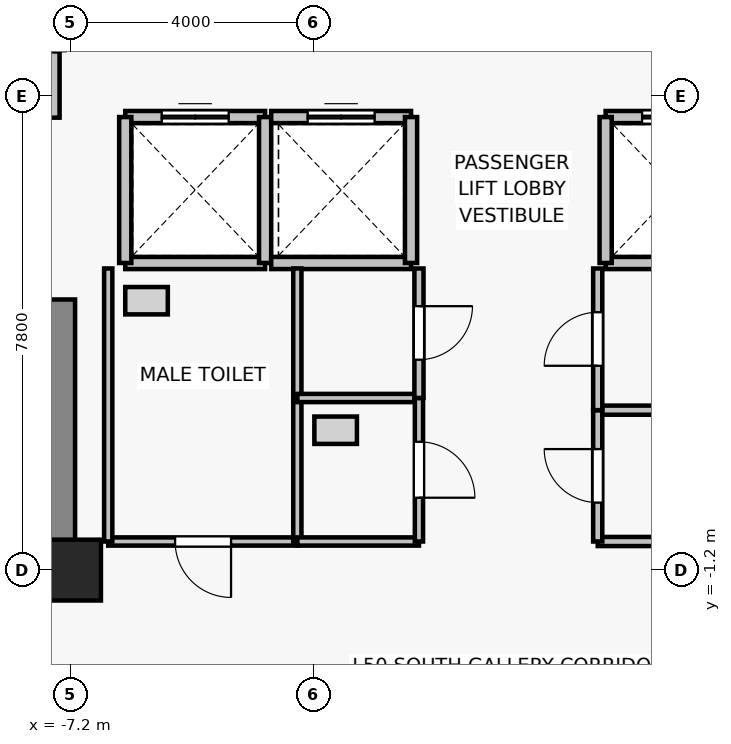
"""IFC4 building model, lengths in metres.
Left out: names, types, materials, properties, quantities, classifications, styles, units other than length and angle.
Written with IfcOpenShell. Run it as: python <this file> out.ifc"""

import sys

from ifc_helpers import new_model, si_unit, direction, frame, frame_2d, origin, origin_2d, place, context, subcontext, project, spatial, rectangle, extrude, source, transform, mapped, element, fill, save


model = new_model("IFC4")
c1 = context("Model", 3, precision=1e-05, world=origin(), true_north=direction((0.0, 1.0)))
c2 = subcontext(c1, "Body", "Model", "MODEL_VIEW")
j1 = project(units=[si_unit("LENGTHUNIT", "METRE"), si_unit("PLANEANGLEUNIT", "RADIAN")], contexts=[c1])
p1 = place(None, origin())
s1 = spatial("IfcSite", under=j1, at=p1, CompositionType="ELEMENT")
p2 = place(p1, origin())
s2 = spatial("IfcBuilding", under=s1, at=p2, CompositionType="ELEMENT")
p3 = place(p2, frame((0.0, 0.0, 179.2)))
s3 = spatial("IfcBuildingStorey", under=s2, at=p3, CompositionType="ELEMENT", Elevation=179.2)
p4 = place(p3, frame((-7.2, -1.2, 0.0), z_axis=(0.0, 0.0, 1.0), x_axis=(1.0, 0.0, 0.0)))
e1 = element("IfcColumn", 1, at=p4, inside=s3, PredefinedType="COLUMN", context=c2, shape_type="SweptSolid", body=[
    extrude(rectangle(XDim=1.0, YDim=1.0, at=origin_2d()), origin(), (0.0, 0.0, 1.0), 3.3),
])
p5 = place(p3, frame((-7.4, -0.825, 0.0), z_axis=(0.0, 0.0, 1.0), x_axis=(0.0, 1.0, 0.0)))
e2 = element("IfcWall", 2, at=p5, inside=s3, PredefinedType="SHEAR", context=c2, shape_type="SweptSolid", body=[
    extrude(rectangle(XDim=4.075, YDim=0.55, at=frame_2d((2.038, 0.0))), origin(), (0.0, 0.0, 1.0), 3.075),
])
p6 = place(p3, frame((-4.0, 3.85, 0.0), z_axis=(0.0, 0.0, 1.0), x_axis=(-1.0, 0.0, 0.0)))
e3 = element("IfcWall", 3, at=p6, inside=s3, PredefinedType="SOLIDWALL", context=c2, shape_type="SweptSolid", body=[
    extrude(rectangle(XDim=2.3, YDim=0.2, at=frame_2d((1.15, 0.0))), origin(), (0.0, 0.0, 1.0), 3.075),
])
p7 = place(p3, frame((-6.3, 6.25, 0.0), z_axis=(0.0, 0.0, 1.0), x_axis=(1.0, 0.0, 0.0)))
e4 = element("IfcWall", 4, at=p7, inside=s3, PredefinedType="SOLIDWALL", context=c2, shape_type="SweptSolid", body=[
    extrude(rectangle(XDim=2.3, YDim=0.2, at=frame_2d((1.15, 0.0))), origin(), (0.0, 0.0, 1.0), 3.075),
])
p8 = place(p7, frame((0.6, 0.0, 0.0)))
e5 = element("IfcOpeningElement", 5, at=p8, cuts=e4, PredefinedType="OPENING", context=c2, shape_type="SweptSolid", body=[
    extrude(rectangle(XDim=1.1, YDim=2.2, at=frame_2d((0.55, 1.1))), frame((0.0, 0.11, 0.0), z_axis=(0.0, -1.0, 0.0), x_axis=(1.0, 0.0, 0.0)), (0.0, 0.0, 1.0), 0.22),
])
for number, where, z_axis, x_axis in (
    (6, (-6.3, 3.85, 0.0), (0.0, 0.0, 1.0), (0.0, 1.0, 0.0)),
    (7, (-4.0, 6.25, 0.0), (0.0, 0.0, 1.0), (0.0, -1.0, 0.0)),
):
    element("IfcWall", number, at=place(p3, frame(where, z_axis=z_axis, x_axis=x_axis)), inside=s3, PredefinedType="SOLIDWALL", context=c2, shape_type="SweptSolid", body=[
        extrude(rectangle(XDim=2.4, YDim=0.2, at=frame_2d((1.2, 0.0))), origin(), (0.0, 0.0, 1.0), 3.075),
    ])
p9 = place(p3, frame((-1.6, 3.85, 0.0), z_axis=(0.0, 0.0, 1.0), x_axis=(-1.0, 0.0, 0.0)))
e8 = element("IfcWall", 8, at=p9, inside=s3, PredefinedType="SOLIDWALL", context=c2, shape_type="SweptSolid", body=[
    extrude(rectangle(XDim=2.3, YDim=0.2, at=frame_2d((1.15, 0.0))), origin(), (0.0, 0.0, 1.0), 3.075),
])
p10 = place(p3, frame((-3.9, 6.25, 0.0), z_axis=(0.0, 0.0, 1.0), x_axis=(1.0, 0.0, 0.0)))
e9 = element("IfcWall", 9, at=p10, inside=s3, PredefinedType="SOLIDWALL", context=c2, shape_type="SweptSolid", body=[
    extrude(rectangle(XDim=2.3, YDim=0.2, at=frame_2d((1.15, 0.0))), origin(), (0.0, 0.0, 1.0), 3.075),
])
p11 = place(p10, frame((0.6, 0.0, 0.0)))
e10 = element("IfcOpeningElement", 10, at=p11, cuts=e9, PredefinedType="OPENING", context=c2, shape_type="SweptSolid", body=[
    extrude(rectangle(XDim=1.1, YDim=2.2, at=frame_2d((0.55, 1.1))), frame((0.0, 0.11, 0.0), z_axis=(0.0, -1.0, 0.0), x_axis=(1.0, 0.0, 0.0)), (0.0, 0.0, 1.0), 0.22),
])
p12 = place(p3, frame((-1.6, 6.25, 0.0), z_axis=(0.0, 0.0, 1.0), x_axis=(0.0, -1.0, 0.0)))
e11 = element("IfcWall", 11, at=p12, inside=s3, PredefinedType="SOLIDWALL", context=c2, shape_type="SweptSolid", body=[
    extrude(rectangle(XDim=2.4, YDim=0.2, at=frame_2d((1.2, 0.0))), origin(), (0.0, 0.0, 1.0), 3.075),
])
p13 = place(p3, frame((3.9, 3.85, 0.0), z_axis=(0.0, 0.0, 1.0), x_axis=(-1.0, 0.0, 0.0)))
e12 = element("IfcWall", 12, at=p13, inside=s3, PredefinedType="SOLIDWALL", context=c2, shape_type="SweptSolid", body=[
    extrude(rectangle(XDim=2.3, YDim=0.2, at=frame_2d((1.15, 0.0))), origin(), (0.0, 0.0, 1.0), 3.075),
])
p14 = place(p3, frame((1.6, 6.25, 0.0), z_axis=(0.0, 0.0, 1.0), x_axis=(1.0, 0.0, 0.0)))
e13 = element("IfcWall", 13, at=p14, inside=s3, PredefinedType="SOLIDWALL", context=c2, shape_type="SweptSolid", body=[
    extrude(rectangle(XDim=2.3, YDim=0.2, at=frame_2d((1.15, 0.0))), origin(), (0.0, 0.0, 1.0), 3.075),
])
p15 = place(p14, frame((0.6, 0.0, 0.0)))
e14 = element("IfcOpeningElement", 14, at=p15, cuts=e13, PredefinedType="OPENING", context=c2, shape_type="SweptSolid", body=[
    extrude(rectangle(XDim=1.1, YDim=2.2, at=frame_2d((0.55, 1.1))), frame((0.0, 0.11, 0.0), z_axis=(0.0, -1.0, 0.0), x_axis=(1.0, 0.0, 0.0)), (0.0, 0.0, 1.0), 0.22),
])
p16 = place(p3, frame((1.6, 3.85, 0.0), z_axis=(0.0, 0.0, 1.0), x_axis=(0.0, 1.0, 0.0)))
e15 = element("IfcWall", 15, at=p16, inside=s3, PredefinedType="SOLIDWALL", context=c2, shape_type="SweptSolid", body=[
    extrude(rectangle(XDim=2.4, YDim=0.2, at=frame_2d((1.2, 0.0))), origin(), (0.0, 0.0, 1.0), 3.075),
])
p17 = place(p3, frame((-7.4, 7.35, 0.0), z_axis=(0.0, 0.0, 1.0), x_axis=(-1.0, 0.0, 0.0)))
e16 = element("IfcWall", 16, at=p17, inside=s3, PredefinedType="SOLIDWALL", context=c2, shape_type="SweptSolid", body=[
    extrude(rectangle(XDim=2.2, YDim=0.2, at=frame_2d((1.1, 0.0))), origin(), (0.0, 0.0, 1.0), 2.565),
])
p18 = place(p3, frame((-7.47, 7.33, 0.0), z_axis=(0.0, 0.0, 1.0), x_axis=(0.0, -1.0, 0.0)))
e17 = element("IfcWall", 17, at=p18, inside=s3, PredefinedType="PARTITIONING", context=c2, shape_type="SweptSolid", body=[
    extrude(rectangle(XDim=1.09, YDim=0.18, at=frame_2d((0.545, 0.0))), origin(), (0.0, 0.0, 1.0), 2.565),
])
p19 = place(p3, frame((-3.47, -0.73, 0.0), z_axis=(0.0, 0.0, 1.0), x_axis=(-1.0, 0.0, 0.0)))
e18 = element("IfcWall", 18, at=p19, inside=s3, PredefinedType="PARTITIONING", context=c2, shape_type="SweptSolid", body=[
    extrude(rectangle(XDim=3.11, YDim=0.135, at=frame_2d((1.555, 0.0))), origin(), (0.0, 0.0, 1.0), 3.075),
])
p20 = place(p19, frame((1.09, 0.0, 0.0)))
e19 = element("IfcOpeningElement", 19, at=p20, cuts=e18, PredefinedType="OPENING", context=c2, shape_type="SweptSolid", body=[
    extrude(rectangle(XDim=0.92, YDim=2.1, at=frame_2d((0.46, 1.05))), frame((0.0, 0.077, 0.0), z_axis=(0.0, -1.0, 0.0), x_axis=(1.0, 0.0, 0.0)), (0.0, 0.0, 1.0), 0.155),
])
for number, where, z_axis, x_axis in (
    (20, (-6.58, -0.73, 0.0), (0.0, 0.0, 1.0), (0.0, 1.0, 0.0)),
    (21, (-3.47, 3.76, 0.0), (0.0, 0.0, 1.0), (0.0, -1.0, 0.0)),
):
    element("IfcWall", number, at=place(p3, frame(where, z_axis=z_axis, x_axis=x_axis)), inside=s3, PredefinedType="PARTITIONING", context=c2, shape_type="SweptSolid", body=[
        extrude(rectangle(XDim=4.49, YDim=0.135, at=frame_2d((2.245, 0.0))), origin(), (0.0, 0.0, 1.0), 3.075),
    ])
for number, where, z_axis, x_axis in (
    (22, (-1.47, -0.73, 0.0), (0.0, 0.0, 1.0), (-1.0, 0.0, 0.0)),
    (23, (-3.47, 1.63, 0.0), (0.0, 0.0, 1.0), (1.0, 0.0, 0.0)),
):
    element("IfcWall", number, at=place(p3, frame(where, z_axis=z_axis, x_axis=x_axis)), inside=s3, PredefinedType="PARTITIONING", context=c2, shape_type="SweptSolid", body=[
        extrude(rectangle(XDim=2.0, YDim=0.135, at=frame_2d((1.0, 0.0))), origin(), (0.0, 0.0, 1.0), 3.075),
    ])
p21 = place(p3, frame((-1.47, 1.63, 0.0), z_axis=(0.0, 0.0, 1.0), x_axis=(0.0, -1.0, 0.0)))
e24 = element("IfcWall", 24, at=p21, inside=s3, PredefinedType="PARTITIONING", context=c2, shape_type="SweptSolid", body=[
    extrude(rectangle(XDim=2.36, YDim=0.135, at=frame_2d((1.18, 0.0))), origin(), (0.0, 0.0, 1.0), 3.075),
])
p22 = place(p21, frame((0.72, 0.0, 0.0)))
e25 = element("IfcOpeningElement", 25, at=p22, cuts=e24, PredefinedType="OPENING", context=c2, shape_type="SweptSolid", body=[
    extrude(rectangle(XDim=0.92, YDim=2.1, at=frame_2d((0.46, 1.05))), frame((0.0, 0.077, 0.0), z_axis=(0.0, -1.0, 0.0), x_axis=(1.0, 0.0, 0.0)), (0.0, 0.0, 1.0), 0.155),
])
p23 = place(p3, frame((-1.47, 3.76, 0.0), z_axis=(0.0, 0.0, 1.0), x_axis=(0.0, -1.0, 0.0)))
e26 = element("IfcWall", 26, at=p23, inside=s3, PredefinedType="PARTITIONING", context=c2, shape_type="SweptSolid", body=[
    extrude(rectangle(XDim=2.13, YDim=0.15, at=frame_2d((1.065, 0.0))), origin(), (0.0, 0.0, 1.0), 3.075),
])
p24 = place(p23, frame((0.62, 0.0, 0.0)))
e27 = element("IfcOpeningElement", 27, at=p24, cuts=e26, PredefinedType="OPENING", context=c2, shape_type="SweptSolid", body=[
    extrude(rectangle(XDim=0.88, YDim=2.1, at=frame_2d((0.44, 1.05))), frame((0.0, 0.085, 0.0), z_axis=(0.0, -1.0, 0.0), x_axis=(1.0, 0.0, 0.0)), (0.0, 0.0, 1.0), 0.17),
])
for number, where, z_axis, x_axis in (
    (28, (3.68, -0.73, 0.0), (0.0, 0.0, 1.0), (-1.0, 0.0, 0.0)),
    (29, (1.47, 1.43, 0.0), (0.0, 0.0, 1.0), (1.0, 0.0, 0.0)),
):
    element("IfcWall", number, at=place(p3, frame(where, z_axis=z_axis, x_axis=x_axis)), inside=s3, PredefinedType="PARTITIONING", context=c2, shape_type="SweptSolid", body=[
        extrude(rectangle(XDim=2.21, YDim=0.15, at=frame_2d((1.105, 0.0))), origin(), (0.0, 0.0, 1.0), 3.075),
    ])
p25 = place(p3, frame((1.47, -0.73, 0.0), z_axis=(0.0, 0.0, 1.0), x_axis=(0.0, 1.0, 0.0)))
e30 = element("IfcWall", 30, at=p25, inside=s3, PredefinedType="PARTITIONING", context=c2, shape_type="SweptSolid", body=[
    extrude(rectangle(XDim=2.16, YDim=0.15, at=frame_2d((1.08, 0.0))), origin(), (0.0, 0.0, 1.0), 3.075),
])
p26 = place(p25, frame((0.64, 0.0, 0.0)))
e31 = element("IfcOpeningElement", 31, at=p26, cuts=e30, PredefinedType="OPENING", context=c2, shape_type="SweptSolid", body=[
    extrude(rectangle(XDim=0.88, YDim=2.1, at=frame_2d((0.44, 1.05))), frame((0.0, 0.085, 0.0), z_axis=(0.0, -1.0, 0.0), x_axis=(1.0, 0.0, 0.0)), (0.0, 0.0, 1.0), 0.17),
])
p27 = place(p3, frame((1.47, 1.43, 0.0), z_axis=(0.0, 0.0, 1.0), x_axis=(0.0, 1.0, 0.0)))
e32 = element("IfcWall", 32, at=p27, inside=s3, PredefinedType="PARTITIONING", context=c2, shape_type="SweptSolid", body=[
    extrude(rectangle(XDim=2.33, YDim=0.15, at=frame_2d((1.165, 0.0))), origin(), (0.0, 0.0, 1.0), 3.075),
])
p28 = place(p27, frame((0.73, 0.0, 0.0)))
e33 = element("IfcOpeningElement", 33, at=p28, cuts=e32, PredefinedType="OPENING", context=c2, shape_type="SweptSolid", body=[
    extrude(rectangle(XDim=0.88, YDim=2.15, at=frame_2d((0.44, 1.075))), frame((0.0, 0.085, 0.0), z_axis=(0.0, -1.0, 0.0), x_axis=(1.0, 0.0, 0.0)), (0.0, 0.0, 1.0), 0.17),
])
m1 = source(origin(), c2, "Body", "SweptSolid", [
    extrude(rectangle(XDim=1.1, YDim=2.2, at=frame_2d((0.55, 1.1))), frame((0.0, 0.025, 0.0), z_axis=(0.0, -1.0, 0.0), x_axis=(1.0, 0.0, 0.0)), (0.0, 0.0, 1.0), 0.05),
])
p29 = place(p8, origin())
e34 = element("IfcDoor", 34, at=p29, inside=s3, OperationType="DOUBLE_DOOR_SLIDING", PredefinedType="DOOR", context=c2, shape_type="MappedRepresentation", body=[
    mapped(m1, transform((0.0, 0.0, 0.0), x_axis=(1.0, 0.0, 0.0), y_axis=(0.0, 1.0, 0.0), z_axis=(0.0, 0.0, 1.0), scale=1.0)),
])
fill(e5, e34)
p30 = place(p11, origin())
e35 = element("IfcDoor", 35, at=p30, inside=s3, OperationType="DOUBLE_DOOR_SLIDING", PredefinedType="DOOR", context=c2, shape_type="MappedRepresentation", body=[
    mapped(m1, transform((0.0, 0.0, 0.0), x_axis=(1.0, 0.0, 0.0), y_axis=(0.0, 1.0, 0.0), z_axis=(0.0, 0.0, 1.0), scale=1.0)),
])
fill(e10, e35)
p31 = place(p15, origin())
e36 = element("IfcDoor", 36, at=p31, inside=s3, OperationType="DOUBLE_DOOR_SLIDING", PredefinedType="DOOR", context=c2, shape_type="MappedRepresentation", body=[
    mapped(m1, transform((0.0, 0.0, 0.0), x_axis=(1.0, 0.0, 0.0), y_axis=(0.0, 1.0, 0.0), z_axis=(0.0, 0.0, 1.0), scale=1.0)),
])
fill(e14, e36)
m2 = source(origin(), c2, "Body", "SweptSolid", [
    extrude(rectangle(XDim=0.92, YDim=2.1, at=frame_2d((0.46, 1.05))), frame((0.0, 0.025, 0.0), z_axis=(0.0, -1.0, 0.0), x_axis=(1.0, 0.0, 0.0)), (0.0, 0.0, 1.0), 0.05),
])
p32 = place(p20, origin())
e37 = element("IfcDoor", 37, at=p32, inside=s3, OperationType="SINGLE_SWING_LEFT", PredefinedType="DOOR", context=c2, shape_type="MappedRepresentation", body=[
    mapped(m2, transform((0.0, 0.0, 0.0), x_axis=(1.0, 0.0, 0.0), y_axis=(0.0, 1.0, 0.0), z_axis=(0.0, 0.0, 1.0), scale=1.0)),
])
fill(e19, e37)
p33 = place(p22, origin())
e38 = element("IfcDoor", 38, at=p33, inside=s3, OperationType="SINGLE_SWING_RIGHT", PredefinedType="DOOR", context=c2, shape_type="MappedRepresentation", body=[
    mapped(m2, transform((0.0, 0.0, 0.0), x_axis=(1.0, 0.0, 0.0), y_axis=(0.0, 1.0, 0.0), z_axis=(0.0, 0.0, 1.0), scale=1.0)),
])
fill(e25, e38)
m3 = source(origin(), c2, "Body", "SweptSolid", [
    extrude(rectangle(XDim=0.88, YDim=2.1, at=frame_2d((0.44, 1.05))), frame((0.0, 0.025, 0.0), z_axis=(0.0, -1.0, 0.0), x_axis=(1.0, 0.0, 0.0)), (0.0, 0.0, 1.0), 0.05),
])
p34 = place(p24, origin())
e39 = element("IfcDoor", 39, at=p34, inside=s3, OperationType="SINGLE_SWING_LEFT", PredefinedType="DOOR", context=c2, shape_type="MappedRepresentation", body=[
    mapped(m3, transform((0.0, 0.0, 0.0), x_axis=(1.0, 0.0, 0.0), y_axis=(0.0, 1.0, 0.0), z_axis=(0.0, 0.0, 1.0), scale=1.0)),
])
fill(e27, e39)
p35 = place(p26, origin())
e40 = element("IfcDoor", 40, at=p35, inside=s3, OperationType="SINGLE_SWING_RIGHT", PredefinedType="DOOR", context=c2, shape_type="MappedRepresentation", body=[
    mapped(m3, transform((0.0, 0.0, 0.0), x_axis=(1.0, 0.0, 0.0), y_axis=(0.0, 1.0, 0.0), z_axis=(0.0, 0.0, 1.0), scale=1.0)),
])
fill(e31, e40)
m4 = source(origin(), c2, "Body", "SweptSolid", [
    extrude(rectangle(XDim=0.88, YDim=2.15, at=frame_2d((0.44, 1.075))), frame((0.0, 0.025, 0.0), z_axis=(0.0, -1.0, 0.0), x_axis=(1.0, 0.0, 0.0)), (0.0, 0.0, 1.0), 0.05),
])
p36 = place(p28, origin())
e41 = element("IfcDoor", 41, at=p36, inside=s3, OperationType="SINGLE_SWING_LEFT", PredefinedType="DOOR", context=c2, shape_type="MappedRepresentation", body=[
    mapped(m4, transform((0.0, 0.0, 0.0), x_axis=(1.0, 0.0, 0.0), y_axis=(0.0, 1.0, 0.0), z_axis=(0.0, 0.0, 1.0), scale=1.0)),
])
fill(e33, e41)
save(model, sys.argv[1])
